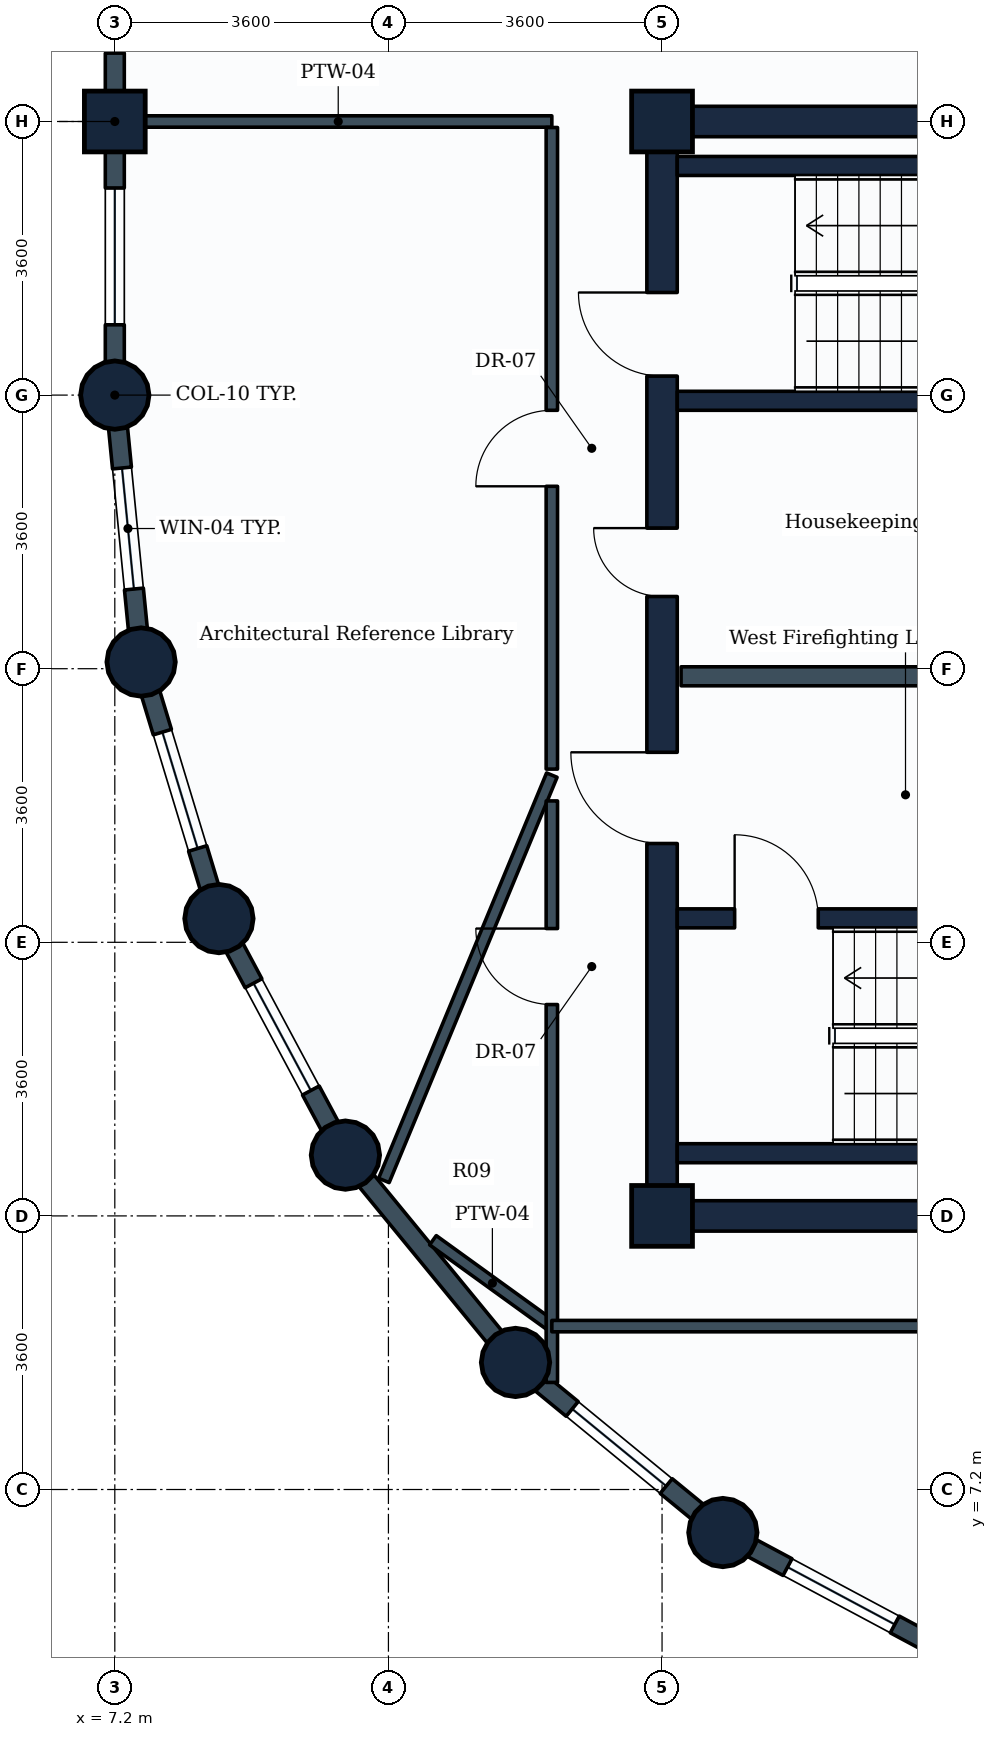
"""IFC4 building model, lengths in metres.
Left out: names, types, materials, properties, quantities, classifications, styles, units other than length and angle.
Written with IfcOpenShell. Run it as: python <this file> out.ifc"""

import sys

from ifc_helpers import new_model, si_unit, direction, frame, frame_2d, origin, origin_2d, place, context, subcontext, project, spatial, rectangle, circle, extrude, element, fill, save


model = new_model("IFC4")
c1 = context("Model", 3, precision=1e-05, world=origin(), true_north=direction((0.0, 1.0)))
c2 = subcontext(c1, "Body", "Model", "MODEL_VIEW")
j1 = project(units=[si_unit("LENGTHUNIT", "METRE"), si_unit("PLANEANGLEUNIT", "RADIAN")], contexts=[c1])
p1 = place(None, origin())
s1 = spatial("IfcSite", under=j1, at=p1, CompositionType="ELEMENT")
p2 = place(p1, origin())
s2 = spatial("IfcBuilding", under=s1, at=p2, CompositionType="ELEMENT")
p3 = place(p2, frame((0.0, 0.0, 259.4)))
s3 = spatial("IfcBuildingStorey", under=s2, at=p3, CompositionType="ELEMENT", Elevation=259.4)
p4 = place(p3, frame((7.2, 21.6, 0.0), z_axis=(0.0, 0.0, 1.0), x_axis=(1.0, 0.0, 0.0)))
e1 = element("IfcColumn", 1, at=p4, inside=s3, PredefinedType="COLUMN", context=c2, shape_type="SweptSolid", body=[
    extrude(circle(Radius=0.45, at=origin_2d()), origin(), (0.0, 0.0, 1.0), 3.6),
])
p5 = place(p3, frame((7.2, 25.2, 0.0), z_axis=(0.0, 0.0, 1.0), x_axis=(0.0, 1.0, 0.0)))
e2 = element("IfcColumn", 2, at=p5, inside=s3, PredefinedType="COLUMN", context=c2, shape_type="SweptSolid", body=[
    extrude(rectangle(XDim=0.8, YDim=0.8, at=origin_2d()), origin(), (0.0, 0.0, 1.0), 3.6),
])
for number, where, z_axis, x_axis in (
    (3, (7.546, 18.088, 0.0), (0.0, 0.0, 1.0), (1.0, 0.0, 0.0)),
    (4, (8.57, 14.712, 0.0), (0.0, 0.0, 1.0), (1.0, 0.0, 0.0)),
    (5, (10.234, 11.6, 0.0), (0.0, 0.0, 1.0), (1.0, 0.0, 0.0)),
    (6, (12.472, 8.872, 0.0), (0.0, 0.0, 1.0), (1.0, 0.0, 0.0)),
):
    element("IfcColumn", number, at=place(p3, frame(where, z_axis=z_axis, x_axis=x_axis)), inside=s3, PredefinedType="COLUMN", context=c2, shape_type="SweptSolid", body=[
        extrude(circle(Radius=0.45, at=origin_2d()), origin(), (0.0, 0.0, 1.0), 3.6),
    ])
for number, where, z_axis, x_axis in (
    (7, (14.4, 10.8, 0.0), (0.0, 0.0, 1.0), (1.0, 0.0, 0.0)),
    (8, (14.4, 25.2, 0.0), (0.0, 0.0, 1.0), (1.0, 0.0, 0.0)),
):
    element("IfcColumn", number, at=place(p3, frame(where, z_axis=z_axis, x_axis=x_axis)), inside=s3, PredefinedType="COLUMN", context=c2, shape_type="SweptSolid", body=[
        extrude(rectangle(XDim=0.8, YDim=0.8, at=origin_2d()), origin(), (0.0, 0.0, 1.0), 3.6),
    ])
p6 = place(p3, frame((15.2, 6.634, 0.0), z_axis=(0.0, 0.0, 1.0), x_axis=(1.0, 0.0, 0.0)))
e9 = element("IfcColumn", 9, at=p6, inside=s3, PredefinedType="COLUMN", context=c2, shape_type="SweptSolid", body=[
    extrude(circle(Radius=0.45, at=origin_2d()), origin(), (0.0, 0.0, 1.0), 3.6),
])
p7 = place(p3, frame((7.2, 25.2, 0.0), z_axis=(0.0, 0.0, 1.0), x_axis=(0.0, 1.0, 0.0)))
e10 = element("IfcWall", 10, at=p7, inside=s3, PredefinedType="STANDARD", context=c2, shape_type="SweptSolid", body=[
    extrude(rectangle(XDim=3.6, YDim=0.25, at=frame_2d((1.8, 0.0))), origin(), (0.0, 0.0, 1.0), 2.83),
])
p8 = place(p7, frame((0.9, 0.0, 0.85)))
e11 = element("IfcOpeningElement", 11, at=p8, cuts=e10, PredefinedType="OPENING", context=c2, shape_type="SweptSolid", body=[
    extrude(rectangle(XDim=1.8, YDim=1.35, at=frame_2d((0.9, 0.675))), frame((0.0, 0.135, 0.0), z_axis=(0.0, -1.0, 0.0), x_axis=(1.0, 0.0, 0.0)), (0.0, 0.0, 1.0), 0.27),
])
p9 = place(p3, frame((7.2, 21.6, 0.0), z_axis=(0.0, 0.0, 1.0), x_axis=(0.0, 1.0, 0.0)))
e12 = element("IfcWall", 12, at=p9, inside=s3, PredefinedType="STANDARD", context=c2, shape_type="SweptSolid", body=[
    extrude(rectangle(XDim=3.6, YDim=0.25, at=frame_2d((1.8, 0.0))), origin(), (0.0, 0.0, 1.0), 2.83),
])
p10 = place(p9, frame((0.925, 0.0, 0.85)))
e13 = element("IfcOpeningElement", 13, at=p10, cuts=e12, PredefinedType="OPENING", context=c2, shape_type="SweptSolid", body=[
    extrude(rectangle(XDim=1.8, YDim=1.35, at=frame_2d((0.9, 0.675))), frame((0.0, 0.135, 0.0), z_axis=(0.0, -1.0, 0.0), x_axis=(1.0, 0.0, 0.0)), (0.0, 0.0, 1.0), 0.27),
])
p11 = place(p3, frame((7.546, 18.088, 0.0), z_axis=(0.0, 0.0, 1.0), x_axis=(-0.09802417461, 0.995184033831, 0.0)))
e14 = element("IfcWall", 14, at=p11, inside=s3, PredefinedType="STANDARD", context=c2, shape_type="SweptSolid", body=[
    extrude(rectangle(XDim=3.529, YDim=0.25, at=frame_2d((1.765, 0.0))), origin(), (0.0, 0.0, 1.0), 2.83),
])
p12 = place(p11, frame((0.965, 0.0, 0.85)))
e15 = element("IfcOpeningElement", 15, at=p12, cuts=e14, PredefinedType="OPENING", context=c2, shape_type="SweptSolid", body=[
    extrude(rectangle(XDim=1.6, YDim=1.35, at=frame_2d((0.8, 0.675))), frame((0.0, 0.135, 0.0), z_axis=(0.0, -1.0, 0.0), x_axis=(1.0, 0.0, 0.0)), (0.0, 0.0, 1.0), 0.27),
])
p13 = place(p3, frame((8.57, 14.712, 0.0), z_axis=(0.0, 0.0, 1.0), x_axis=(-0.290305086481, 0.956934144423, 0.0)))
e16 = element("IfcWall", 16, at=p13, inside=s3, PredefinedType="STANDARD", context=c2, shape_type="SweptSolid", body=[
    extrude(rectangle(XDim=3.528, YDim=0.25, at=frame_2d((1.764, 0.0))), origin(), (0.0, 0.0, 1.0), 2.83),
])
p14 = place(p13, frame((0.964, 0.0, 0.85)))
e17 = element("IfcOpeningElement", 17, at=p14, cuts=e16, PredefinedType="OPENING", context=c2, shape_type="SweptSolid", body=[
    extrude(rectangle(XDim=1.6, YDim=1.35, at=frame_2d((0.8, 0.675))), frame((0.0, 0.135, 0.0), z_axis=(0.0, -1.0, 0.0), x_axis=(1.0, 0.0, 0.0)), (0.0, 0.0, 1.0), 0.27),
])
p15 = place(p3, frame((10.234, 11.6, 0.0), z_axis=(0.0, 0.0, 1.0), x_axis=(-0.47151087309, 0.881860247748, 0.0)))
e18 = element("IfcWall", 18, at=p15, inside=s3, PredefinedType="STANDARD", context=c2, shape_type="SweptSolid", body=[
    extrude(rectangle(XDim=3.529, YDim=0.25, at=frame_2d((1.764, 0.0))), origin(), (0.0, 0.0, 1.0), 2.83),
])
p16 = place(p15, frame((0.964, 0.0, 0.85)))
e19 = element("IfcOpeningElement", 19, at=p16, cuts=e18, PredefinedType="OPENING", context=c2, shape_type="SweptSolid", body=[
    extrude(rectangle(XDim=1.6, YDim=1.35, at=frame_2d((0.8, 0.675))), frame((0.0, 0.135, 0.0), z_axis=(0.0, -1.0, 0.0), x_axis=(1.0, 0.0, 0.0)), (0.0, 0.0, 1.0), 0.27),
])
p17 = place(p3, frame((12.472, 8.872, 0.0), z_axis=(0.0, 0.0, 1.0), x_axis=(-0.634258295121, 0.773121216285, 0.0)))
e20 = element("IfcWall", 20, at=p17, inside=s3, PredefinedType="STANDARD", context=c2, shape_type="SweptSolid", body=[
    extrude(rectangle(XDim=3.529, YDim=0.25, at=frame_2d((1.764, 0.0))), origin(), (0.0, 0.0, 1.0), 2.83),
])
p18 = place(p3, frame((15.2, 6.634, 0.0), z_axis=(0.0, 0.0, 1.0), x_axis=(-0.773121216285, 0.634258295121, 0.0)))
e21 = element("IfcWall", 21, at=p18, inside=s3, PredefinedType="STANDARD", context=c2, shape_type="SweptSolid", body=[
    extrude(rectangle(XDim=3.529, YDim=0.25, at=frame_2d((1.764, 0.0))), origin(), (0.0, 0.0, 1.0), 2.83),
])
p19 = place(p18, frame((0.964, 0.0, 0.85)))
e22 = element("IfcOpeningElement", 22, at=p19, cuts=e21, PredefinedType="OPENING", context=c2, shape_type="SweptSolid", body=[
    extrude(rectangle(XDim=1.6, YDim=1.35, at=frame_2d((0.8, 0.675))), frame((0.0, 0.135, 0.0), z_axis=(0.0, -1.0, 0.0), x_axis=(1.0, 0.0, 0.0)), (0.0, 0.0, 1.0), 0.27),
])
p20 = place(p3, frame((18.312, 4.97, 0.0), z_axis=(0.0, 0.0, 1.0), x_axis=(-0.881846862014, 0.471535907389, 0.0)))
e23 = element("IfcWall", 23, at=p20, inside=s3, PredefinedType="STANDARD", context=c2, shape_type="SweptSolid", body=[
    extrude(rectangle(XDim=3.529, YDim=0.25, at=frame_2d((1.765, 0.0))), origin(), (0.0, 0.0, 1.0), 2.83),
])
p21 = place(p20, frame((0.964, 0.0, 0.85)))
e24 = element("IfcOpeningElement", 24, at=p21, cuts=e23, PredefinedType="OPENING", context=c2, shape_type="SweptSolid", body=[
    extrude(rectangle(XDim=1.6, YDim=1.35, at=frame_2d((0.8, 0.675))), frame((0.0, 0.135, 0.0), z_axis=(0.0, -1.0, 0.0), x_axis=(1.0, 0.0, 0.0)), (0.0, 0.0, 1.0), 0.27),
])
p22 = place(p3, frame((14.4, 10.8, 0.0), z_axis=(0.0, 0.0, 1.0), x_axis=(1.0, 0.0, 0.0)))
e25 = element("IfcWall", 25, at=p22, inside=s3, PredefinedType="SHEAR", context=c2, shape_type="SweptSolid", body=[
    extrude(rectangle(XDim=18.0, YDim=0.4, at=frame_2d((9.0, 0.0))), origin(), (0.0, 0.0, 1.0), 3.35),
])
p23 = place(p3, frame((14.4, 25.2, 0.0), z_axis=(0.0, 0.0, 1.0), x_axis=(1.0, 0.0, 0.0)))
e26 = element("IfcWall", 26, at=p23, inside=s3, PredefinedType="SHEAR", context=c2, shape_type="SweptSolid", body=[
    extrude(rectangle(XDim=10.8, YDim=0.4, at=frame_2d((5.4, 0.0))), origin(), (0.0, 0.0, 1.0), 3.35),
])
p24 = place(p3, frame((14.4, 10.8, 0.0), z_axis=(0.0, 0.0, 1.0), x_axis=(0.0, 1.0, 0.0)))
e27 = element("IfcWall", 27, at=p24, inside=s3, PredefinedType="SHEAR", context=c2, shape_type="SweptSolid", body=[
    extrude(rectangle(XDim=14.4, YDim=0.4, at=frame_2d((7.2, 0.0))), origin(), (0.0, 0.0, 1.0), 3.35),
])
p25 = place(p24, frame((11.05, 0.0, 0.0)))
e28 = element("IfcOpeningElement", 28, at=p25, cuts=e27, PredefinedType="OPENING", context=c2, shape_type="SweptSolid", body=[
    extrude(rectangle(XDim=1.1, YDim=2.1, at=frame_2d((0.55, 1.05))), frame((0.0, 0.21, 0.0), z_axis=(0.0, -1.0, 0.0), x_axis=(1.0, 0.0, 0.0)), (0.0, 0.0, 1.0), 0.42),
])
p26 = place(p24, frame((4.9, 0.0, 0.0)))
e29 = element("IfcOpeningElement", 29, at=p26, cuts=e27, PredefinedType="OPENING", context=c2, shape_type="SweptSolid", body=[
    extrude(rectangle(XDim=1.2, YDim=2.1, at=frame_2d((0.6, 1.05))), frame((0.0, 0.21, 0.0), z_axis=(0.0, -1.0, 0.0), x_axis=(1.0, 0.0, 0.0)), (0.0, 0.0, 1.0), 0.42),
])
p27 = place(p24, frame((8.15, 0.0, 0.0)))
e30 = element("IfcOpeningElement", 30, at=p27, cuts=e27, PredefinedType="OPENING", context=c2, shape_type="SweptSolid", body=[
    extrude(rectangle(XDim=0.9, YDim=2.1, at=frame_2d((0.45, 1.05))), frame((0.0, 0.21, 0.0), z_axis=(0.0, -1.0, 0.0), x_axis=(1.0, 0.0, 0.0)), (0.0, 0.0, 1.0), 0.42),
])
p28 = place(p3, frame((14.6, 11.625, 0.0), z_axis=(0.0, 0.0, 1.0), x_axis=(1.0, 0.0, 0.0)))
e31 = element("IfcWall", 31, at=p28, inside=s3, PredefinedType="SHEAR", context=c2, shape_type="SweptSolid", body=[
    extrude(rectangle(XDim=8.75, YDim=0.25, at=frame_2d((4.375, 0.0))), origin(), (0.0, 0.0, 1.0), 3.35),
])
p29 = place(p3, frame((14.6, 14.715, 0.0), z_axis=(0.0, 0.0, 1.0), x_axis=(1.0, 0.0, 0.0)))
e32 = element("IfcWall", 32, at=p29, inside=s3, PredefinedType="SHEAR", context=c2, shape_type="SweptSolid", body=[
    extrude(rectangle(XDim=8.75, YDim=0.25, at=frame_2d((4.375, 0.0))), origin(), (0.0, 0.0, 1.0), 3.35),
])
p30 = place(p29, frame((0.755, 0.0, 0.0)))
e33 = element("IfcOpeningElement", 33, at=p30, cuts=e32, PredefinedType="OPENING", context=c2, shape_type="SweptSolid", body=[
    extrude(rectangle(XDim=1.1, YDim=2.1, at=frame_2d((0.55, 1.05))), frame((0.0, 0.135, 0.0), z_axis=(0.0, -1.0, 0.0), x_axis=(1.0, 0.0, 0.0)), (0.0, 0.0, 1.0), 0.27),
])
for number, where, z_axis, x_axis in (
    (34, (14.6, 21.525, 0.0), (0.0, 0.0, 1.0), (1.0, 0.0, 0.0)),
    (35, (14.6, 24.615, 0.0), (0.0, 0.0, 1.0), (1.0, 0.0, 0.0)),
):
    element("IfcWall", number, at=place(p3, frame(where, z_axis=z_axis, x_axis=x_axis)), inside=s3, PredefinedType="SHEAR", context=c2, shape_type="SweptSolid", body=[
        extrude(rectangle(XDim=8.3, YDim=0.25, at=frame_2d((4.15, 0.0))), origin(), (0.0, 0.0, 1.0), 3.35),
    ])
p31 = place(p3, frame((14.65, 17.9, 0.0), z_axis=(0.0, 0.0, 1.0), x_axis=(1.0, 0.0, 0.0)))
e36 = element("IfcWall", 36, at=p31, inside=s3, PredefinedType="PARTITIONING", context=c2, shape_type="SweptSolid", body=[
    extrude(rectangle(XDim=7.15, YDim=0.25, at=frame_2d((3.575, 0.0))), origin(), (0.0, 0.0, 1.0), 3.335),
])
p32 = place(p3, frame((7.329, 25.2, 0.0), z_axis=(0.0, 0.0, 1.0), x_axis=(1.0, 0.0, 0.0)))
e37 = element("IfcWall", 37, at=p32, inside=s3, PredefinedType="PARTITIONING", context=c2, shape_type="SweptSolid", body=[
    extrude(rectangle(XDim=5.621, YDim=0.15, at=frame_2d((2.811, 0.0))), origin(), (0.0, 0.0, 1.0), 3.335),
])
p33 = place(p3, frame((12.95, 9.35, 0.0), z_axis=(0.0, 0.0, 1.0), x_axis=(-0.8106792284, 0.585490553844, 0.0)))
e38 = element("IfcWall", 38, at=p33, inside=s3, PredefinedType="PARTITIONING", context=c2, shape_type="SweptSolid", body=[
    extrude(rectangle(XDim=1.93, YDim=0.15, at=frame_2d((0.965, 0.0))), origin(), (0.0, 0.0, 1.0), 2.83),
])
p34 = place(p3, frame((12.95, 16.6, 0.0), z_axis=(0.0, 0.0, 1.0), x_axis=(-0.382758890427, -0.923848273148, 0.0)))
e39 = element("IfcWall", 39, at=p34, inside=s3, PredefinedType="PARTITIONING", context=c2, shape_type="SweptSolid", body=[
    extrude(rectangle(XDim=5.773, YDim=0.15, at=frame_2d((2.887, 0.0))), origin(), (0.0, 0.0, 1.0), 2.83),
])
p35 = place(p3, frame((12.95, 16.679, 0.0), z_axis=(0.0, 0.0, 1.0), x_axis=(0.0, 1.0, 0.0)))
e40 = element("IfcWall", 40, at=p35, inside=s3, PredefinedType="PARTITIONING", context=c2, shape_type="SweptSolid", body=[
    extrude(rectangle(XDim=8.442, YDim=0.15, at=frame_2d((4.221, 0.0))), origin(), (0.0, 0.0, 1.0), 3.02),
])
p36 = place(p35, frame((3.721, 0.0, 0.0)))
e41 = element("IfcOpeningElement", 41, at=p36, cuts=e40, PredefinedType="OPENING", context=c2, shape_type="SweptSolid", body=[
    extrude(rectangle(XDim=1.0, YDim=2.1, at=frame_2d((0.5, 1.05))), frame((0.0, 0.085, 0.0), z_axis=(0.0, -1.0, 0.0), x_axis=(1.0, 0.0, 0.0)), (0.0, 0.0, 1.0), 0.17),
])
p37 = place(p3, frame((12.95, 8.609, 0.0), z_axis=(0.0, 0.0, 1.0), x_axis=(0.0, 1.0, 0.0)))
e42 = element("IfcWall", 42, at=p37, inside=s3, PredefinedType="PARTITIONING", context=c2, shape_type="SweptSolid", body=[
    extrude(rectangle(XDim=7.652, YDim=0.15, at=frame_2d((3.826, 0.0))), origin(), (0.0, 0.0, 1.0), 2.83),
])
p38 = place(p37, frame((4.972, 0.0, 0.0)))
e43 = element("IfcOpeningElement", 43, at=p38, cuts=e42, PredefinedType="OPENING", context=c2, shape_type="SweptSolid", body=[
    extrude(rectangle(XDim=1.0, YDim=2.1, at=frame_2d((0.5, 1.05))), frame((0.0, 0.085, 0.0), z_axis=(0.0, -1.0, 0.0), x_axis=(1.0, 0.0, 0.0)), (0.0, 0.0, 1.0), 0.17),
])
p39 = place(p3, frame((12.95, 9.35, 0.0), z_axis=(0.0, 0.0, 1.0), x_axis=(1.0, 0.0, 0.0)))
e44 = element("IfcWall", 44, at=p39, inside=s3, PredefinedType="PARTITIONING", context=c2, shape_type="SweptSolid", body=[
    extrude(rectangle(XDim=15.771, YDim=0.15, at=frame_2d((7.885, 0.0))), origin(), (0.0, 0.0, 1.0), 3.02),
])
p40 = place(p39, frame((4.836, 0.0, 0.0)))
e45 = element("IfcOpeningElement", 45, at=p40, cuts=e44, PredefinedType="OPENING", context=c2, shape_type="SweptSolid", body=[
    extrude(rectangle(XDim=1.0, YDim=2.1, at=frame_2d((0.5, 1.05))), frame((0.0, 0.085, 0.0), z_axis=(0.0, -1.0, 0.0), x_axis=(1.0, 0.0, 0.0)), (0.0, 0.0, 1.0), 0.17),
])
p41 = place(p8, origin())
e46 = element("IfcWindow", 46, at=p41, inside=s3, PartitioningType="SINGLE_PANEL", PredefinedType="WINDOW", context=c2, shape_type="SweptSolid", body=[
    extrude(rectangle(XDim=1.8, YDim=1.35, at=frame_2d((0.9, 0.675))), frame((0.0, 0.03, 0.0), z_axis=(0.0, -1.0, 0.0), x_axis=(1.0, 0.0, 0.0)), (0.0, 0.0, 1.0), 0.06),
])
fill(e11, e46)
p42 = place(p10, origin())
e47 = element("IfcWindow", 47, at=p42, inside=s3, PartitioningType="SINGLE_PANEL", PredefinedType="WINDOW", context=c2, shape_type="SweptSolid", body=[
    extrude(rectangle(XDim=1.8, YDim=1.35, at=frame_2d((0.9, 0.675))), frame((0.0, 0.03, 0.0), z_axis=(0.0, -1.0, 0.0), x_axis=(1.0, 0.0, 0.0)), (0.0, 0.0, 1.0), 0.06),
])
fill(e13, e47)
p43 = place(p12, origin())
e48 = element("IfcWindow", 48, at=p43, inside=s3, PartitioningType="SINGLE_PANEL", PredefinedType="WINDOW", context=c2, shape_type="SweptSolid", body=[
    extrude(rectangle(XDim=1.6, YDim=1.35, at=frame_2d((0.8, 0.675))), frame((0.0, 0.03, 0.0), z_axis=(0.0, -1.0, 0.0), x_axis=(1.0, 0.0, 0.0)), (0.0, 0.0, 1.0), 0.06),
])
fill(e15, e48)
p44 = place(p14, origin())
e49 = element("IfcWindow", 49, at=p44, inside=s3, PartitioningType="SINGLE_PANEL", PredefinedType="WINDOW", context=c2, shape_type="SweptSolid", body=[
    extrude(rectangle(XDim=1.6, YDim=1.35, at=frame_2d((0.8, 0.675))), frame((0.0, 0.03, 0.0), z_axis=(0.0, -1.0, 0.0), x_axis=(1.0, 0.0, 0.0)), (0.0, 0.0, 1.0), 0.06),
])
fill(e17, e49)
p45 = place(p16, origin())
e50 = element("IfcWindow", 50, at=p45, inside=s3, PartitioningType="SINGLE_PANEL", PredefinedType="WINDOW", context=c2, shape_type="SweptSolid", body=[
    extrude(rectangle(XDim=1.6, YDim=1.35, at=frame_2d((0.8, 0.675))), frame((0.0, 0.03, 0.0), z_axis=(0.0, -1.0, 0.0), x_axis=(1.0, 0.0, 0.0)), (0.0, 0.0, 1.0), 0.06),
])
fill(e19, e50)
p46 = place(p19, origin())
e51 = element("IfcWindow", 51, at=p46, inside=s3, PartitioningType="SINGLE_PANEL", PredefinedType="WINDOW", context=c2, shape_type="SweptSolid", body=[
    extrude(rectangle(XDim=1.6, YDim=1.35, at=frame_2d((0.8, 0.675))), frame((0.0, 0.03, 0.0), z_axis=(0.0, -1.0, 0.0), x_axis=(1.0, 0.0, 0.0)), (0.0, 0.0, 1.0), 0.06),
])
fill(e22, e51)
p47 = place(p21, origin())
e52 = element("IfcWindow", 52, at=p47, inside=s3, PartitioningType="SINGLE_PANEL", PredefinedType="WINDOW", context=c2, shape_type="SweptSolid", body=[
    extrude(rectangle(XDim=1.6, YDim=1.35, at=frame_2d((0.8, 0.675))), frame((0.0, 0.03, 0.0), z_axis=(0.0, -1.0, 0.0), x_axis=(1.0, 0.0, 0.0)), (0.0, 0.0, 1.0), 0.06),
])
fill(e24, e52)
p48 = place(p30, origin())
e53 = element("IfcDoor", 53, at=p48, inside=s3, OperationType="SINGLE_SWING_LEFT", PredefinedType="DOOR", context=c2, shape_type="SweptSolid", body=[
    extrude(rectangle(XDim=1.1, YDim=2.1, at=frame_2d((0.55, 1.05))), frame((0.0, 0.025, 0.0), z_axis=(0.0, -1.0, 0.0), x_axis=(1.0, 0.0, 0.0)), (0.0, 0.0, 1.0), 0.05),
])
fill(e33, e53)
p49 = place(p25, origin())
e54 = element("IfcDoor", 54, at=p49, inside=s3, OperationType="SINGLE_SWING_RIGHT", PredefinedType="DOOR", context=c2, shape_type="SweptSolid", body=[
    extrude(rectangle(XDim=1.1, YDim=2.1, at=frame_2d((0.55, 1.05))), frame((0.0, 0.025, 0.0), z_axis=(0.0, -1.0, 0.0), x_axis=(1.0, 0.0, 0.0)), (0.0, 0.0, 1.0), 0.05),
])
fill(e28, e54)
p50 = place(p26, origin())
e55 = element("IfcDoor", 55, at=p50, inside=s3, OperationType="SINGLE_SWING_RIGHT", PredefinedType="DOOR", context=c2, shape_type="SweptSolid", body=[
    extrude(rectangle(XDim=1.2, YDim=2.1, at=frame_2d((0.6, 1.05))), frame((0.0, 0.025, 0.0), z_axis=(0.0, -1.0, 0.0), x_axis=(1.0, 0.0, 0.0)), (0.0, 0.0, 1.0), 0.05),
])
fill(e29, e55)
p51 = place(p27, origin())
e56 = element("IfcDoor", 56, at=p51, inside=s3, OperationType="SINGLE_SWING_RIGHT", PredefinedType="DOOR", context=c2, shape_type="SweptSolid", body=[
    extrude(rectangle(XDim=0.9, YDim=2.1, at=frame_2d((0.45, 1.05))), frame((0.0, 0.025, 0.0), z_axis=(0.0, -1.0, 0.0), x_axis=(1.0, 0.0, 0.0)), (0.0, 0.0, 1.0), 0.05),
])
fill(e30, e56)
p52 = place(p36, origin())
e57 = element("IfcDoor", 57, at=p52, inside=s3, OperationType="SINGLE_SWING_LEFT", PredefinedType="DOOR", context=c2, shape_type="SweptSolid", body=[
    extrude(rectangle(XDim=1.0, YDim=2.1, at=frame_2d((0.5, 1.05))), frame((0.0, 0.025, 0.0), z_axis=(0.0, -1.0, 0.0), x_axis=(1.0, 0.0, 0.0)), (0.0, 0.0, 1.0), 0.05),
])
fill(e41, e57)
p53 = place(p38, origin())
e58 = element("IfcDoor", 58, at=p53, inside=s3, OperationType="SINGLE_SWING_RIGHT", PredefinedType="DOOR", context=c2, shape_type="SweptSolid", body=[
    extrude(rectangle(XDim=1.0, YDim=2.1, at=frame_2d((0.5, 1.05))), frame((0.0, 0.025, 0.0), z_axis=(0.0, -1.0, 0.0), x_axis=(1.0, 0.0, 0.0)), (0.0, 0.0, 1.0), 0.05),
])
fill(e43, e58)
save(model, sys.argv[1])
